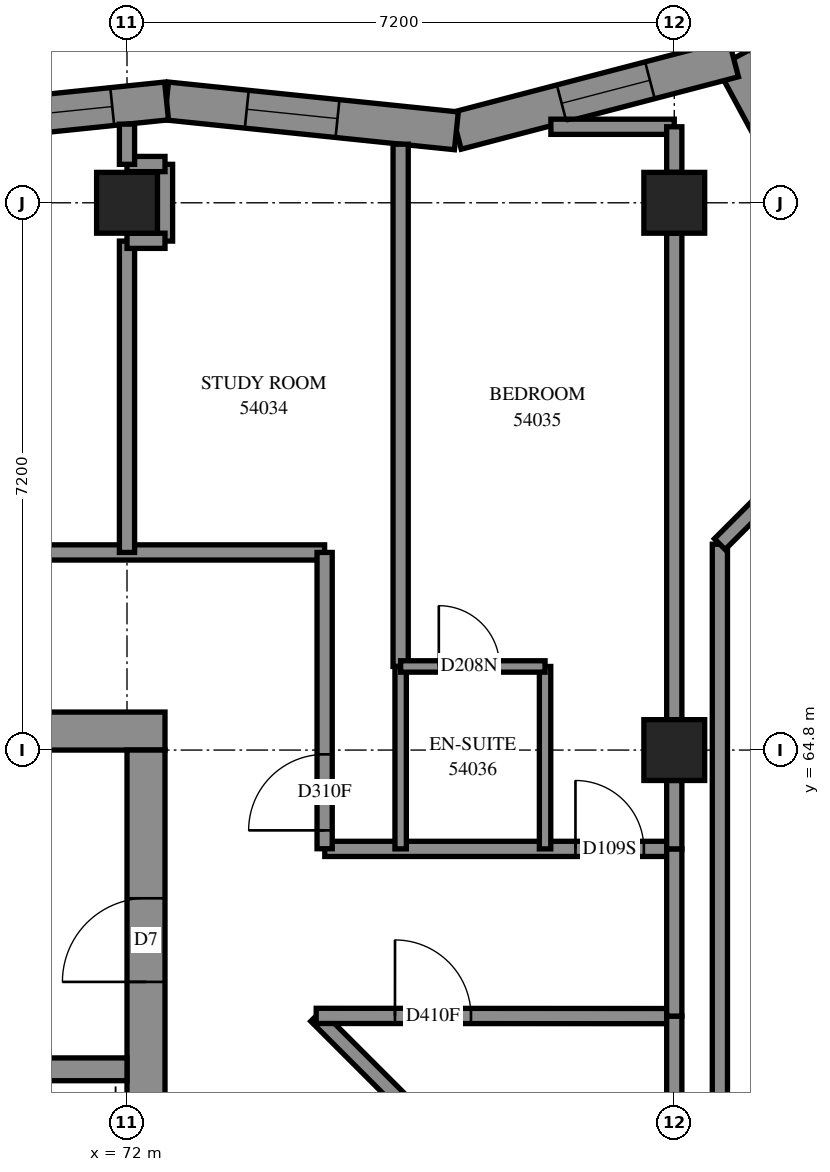
"""IFC4 building model, lengths in metres.
Left out: names, types, materials, properties, quantities, classifications, styles, units other than length and angle.
Written with IfcOpenShell. Run it as: python <this file> out.ifc"""

import sys

from ifc_helpers import new_model, si_unit, direction, frame, frame_2d, origin, origin_2d, place, context, subcontext, project, spatial, polyline, rectangle, outline, extrude, element, fill, save


model = new_model("IFC4")
c1 = context("Model", 3, precision=1e-05, world=origin(), true_north=direction((0.0, 1.0)))
c2 = subcontext(c1, "Body", "Model", "MODEL_VIEW")
j1 = project(units=[si_unit("LENGTHUNIT", "METRE"), si_unit("PLANEANGLEUNIT", "RADIAN")], contexts=[c1])
p1 = place(None, origin())
s1 = spatial("IfcSite", under=j1, at=p1, CompositionType="ELEMENT")
p2 = place(p1, origin())
s2 = spatial("IfcBuilding", under=s1, at=p2, CompositionType="ELEMENT")
p3 = place(p2, frame((0.0, 0.0, 199.8)))
s3 = spatial("IfcBuildingStorey", under=s2, at=p3, CompositionType="ELEMENT", Elevation=199.8)
for number, where, z_axis, x_axis in (
    (1, (72.0, 72.0, 0.0), (0.0, 0.0, 1.0), (1.0, 0.0, 0.0)),
    (2, (79.2, 64.8, 0.0), (0.0, 0.0, 1.0), (1.0, 0.0, 0.0)),
    (3, (79.2, 72.0, 0.0), (0.0, 0.0, 1.0), (1.0, 0.0, 0.0)),
):
    element("IfcColumn", number, at=place(p3, frame(where, z_axis=z_axis, x_axis=x_axis)), inside=s3, PredefinedType="COLUMN", context=c2, shape_type="SweptSolid", body=[
        extrude(rectangle(XDim=0.8, YDim=0.8, at=origin_2d()), origin(), (0.0, 0.0, 1.0), 3.1),
    ])
p4 = place(p3, frame((57.1, 65.05, -0.3), z_axis=(0.0, 0.0, 1.0), x_axis=(1.0, 0.0, 0.0)))
e4 = element("IfcWall", 4, at=p4, inside=s3, PredefinedType="SHEAR", context=c2, shape_type="SweptSolid", body=[
    extrude(rectangle(XDim=15.4, YDim=0.5, at=frame_2d((7.7, 0.0))), origin(), (0.0, 0.0, 1.0), 2.7),
])
p5 = place(p4, frame((10.5, 0.0, 0.3)))
e5 = element("IfcOpeningElement", 5, at=p5, cuts=e4, PredefinedType="OPENING", context=c2, shape_type="SweptSolid", body=[
    extrude(rectangle(XDim=0.8, YDim=2.1, at=frame_2d((0.4, 1.05))), frame((0.0, 0.26, 0.0), z_axis=(0.0, -1.0, 0.0), x_axis=(1.0, 0.0, 0.0)), (0.0, 0.0, 1.0), 0.52),
])
p6 = place(p3, frame((72.25, 50.4, -0.3), z_axis=(0.0, 0.0, 1.0), x_axis=(0.0, 1.0, 0.0)))
e6 = element("IfcWall", 6, at=p6, inside=s3, PredefinedType="SHEAR", context=c2, shape_type="SweptSolid", body=[
    extrude(rectangle(XDim=14.4, YDim=0.5, at=frame_2d((7.2, 0.0))), origin(), (0.0, 0.0, 1.0), 2.7),
])
p7 = place(p6, frame((4.55, 0.0, 0.3)))
e7 = element("IfcOpeningElement", 7, at=p7, cuts=e6, PredefinedType="OPENING", context=c2, shape_type="SweptSolid", body=[
    extrude(rectangle(XDim=1.1, YDim=2.1, at=frame_2d((0.55, 1.05))), frame((0.0, 0.26, 0.0), z_axis=(0.0, -1.0, 0.0), x_axis=(1.0, 0.0, 0.0)), (0.0, 0.0, 1.0), 0.52),
])
p8 = place(p6, frame((11.35, 0.0, 0.3)))
e8 = element("IfcOpeningElement", 8, at=p8, cuts=e6, PredefinedType="OPENING", context=c2, shape_type="SweptSolid", body=[
    extrude(rectangle(XDim=1.1, YDim=2.1, at=frame_2d((0.55, 1.05))), frame((0.0, 0.26, 0.0), z_axis=(0.0, -1.0, 0.0), x_axis=(1.0, 0.0, 0.0)), (0.0, 0.0, 1.0), 0.52),
])
p9 = place(p3, frame((64.8, 60.6, 0.0), z_axis=(0.0, 0.0, 1.0), x_axis=(1.0, 0.0, 0.0)))
e9 = element("IfcWall", 9, at=p9, inside=s3, PredefinedType="SOLIDWALL", context=c2, shape_type="SweptSolid", body=[
    extrude(rectangle(XDim=7.2, YDim=0.3, at=frame_2d((3.6, 0.0))), origin(), (0.0, 0.0, 1.0), 3.1),
])
p10 = place(p3, frame((81.567, 70.971, 0.0), z_axis=(0.0, 0.0, 1.0), x_axis=(-0.476089682, 0.8793967334, 0.0)))
e10 = element("IfcWall", 10, at=p10, inside=s3, PredefinedType="SOLIDWALL", context=c2, shape_type="SweptSolid", body=[
    extrude(outline(polyline([(0.051, -0.25), (3.526, -0.25), (3.134, 0.25), (-0.051, 0.25), (0.051, -0.25)])), origin(), (0.0, 0.0, 1.0), 3.1),
])
p11 = place(p10, frame((0.753, 0.0, 0.45)))
e11 = element("IfcOpeningElement", 11, at=p11, cuts=e10, PredefinedType="OPENING", context=c2, shape_type="SweptSolid", body=[
    extrude(rectangle(XDim=1.2, YDim=2.5, at=frame_2d((0.6, 1.25))), frame((0.0, 0.26, 0.0), z_axis=(0.0, -1.0, 0.0), x_axis=(1.0, 0.0, 0.0)), (0.0, 0.0, 1.0), 0.52),
])
p12 = place(p3, frame((79.981, 73.9, 0.0), z_axis=(0.0, 0.0, 1.0), x_axis=(-0.9675329998, -0.2527447216, 0.0)))
e12 = element("IfcWall", 12, at=p12, inside=s3, PredefinedType="SOLIDWALL", context=c2, shape_type="SweptSolid", body=[
    extrude(outline(polyline([(-0.196, -0.25), (3.725, -0.25), (3.815, 0.25), (0.196, 0.25), (-0.196, -0.25)])), origin(), (0.0, 0.0, 1.0), 3.1),
])
p13 = place(p12, frame((1.139, 0.0, 0.45)))
e13 = element("IfcOpeningElement", 13, at=p13, cuts=e12, PredefinedType="OPENING", context=c2, shape_type="SweptSolid", body=[
    extrude(rectangle(XDim=1.2, YDim=2.5, at=frame_2d((0.6, 1.25))), frame((0.0, 0.26, 0.0), z_axis=(0.0, -1.0, 0.0), x_axis=(1.0, 0.0, 0.0)), (0.0, 0.0, 1.0), 0.52),
])
p14 = place(p3, frame((76.333, 72.947, 0.0), z_axis=(0.0, 0.0, 1.0), x_axis=(-0.994730395, 0.10252532, 0.0)))
e14 = element("IfcWall", 14, at=p14, inside=s3, PredefinedType="SOLIDWALL", context=c2, shape_type="SweptSolid", body=[
    extrude(outline(polyline([(0.045, -0.25), (3.859, -0.25), (3.808, 0.25), (-0.045, 0.25), (0.045, -0.25)])), origin(), (0.0, 0.0, 1.0), 3.1),
])
p15 = place(p14, frame((1.572, 0.0, 0.45)))
e15 = element("IfcOpeningElement", 15, at=p15, cuts=e14, PredefinedType="OPENING", context=c2, shape_type="SweptSolid", body=[
    extrude(rectangle(XDim=1.2, YDim=2.5, at=frame_2d((0.6, 1.25))), frame((0.0, 0.26, 0.0), z_axis=(0.0, -1.0, 0.0), x_axis=(1.0, 0.0, 0.0)), (0.0, 0.0, 1.0), 0.52),
])
p16 = place(p3, frame((72.52, 73.34, 0.0), z_axis=(0.0, 0.0, 1.0), x_axis=(-0.9947306832, -0.1025225234, 0.0)))
e16 = element("IfcWall", 16, at=p16, inside=s3, PredefinedType="SOLIDWALL", context=c2, shape_type="SweptSolid", body=[
    extrude(outline(polyline([(-0.026, -0.25), (3.788, -0.25), (3.84, 0.25), (0.026, 0.25), (-0.026, -0.25)])), origin(), (0.0, 0.0, 1.0), 3.1),
])
p17 = place(p16, frame((0.718, 0.0, 0.45)))
e17 = element("IfcOpeningElement", 17, at=p17, cuts=e16, PredefinedType="OPENING", context=c2, shape_type="SweptSolid", body=[
    extrude(rectangle(XDim=1.3, YDim=2.5, at=frame_2d((0.65, 1.25))), frame((0.0, 0.26, 0.0), z_axis=(0.0, -1.0, 0.0), x_axis=(1.0, 0.0, 0.0)), (0.0, 0.0, 1.0), 0.52),
])
p18 = place(p16, frame((2.168, 0.0, 0.45)))
e18 = element("IfcOpeningElement", 18, at=p18, cuts=e16, PredefinedType="OPENING", context=c2, shape_type="SweptSolid", body=[
    extrude(rectangle(XDim=1.3, YDim=2.5, at=frame_2d((0.65, 1.25))), frame((0.0, 0.26, 0.0), z_axis=(0.0, -1.0, 0.0), x_axis=(1.0, 0.0, 0.0)), (0.0, 0.0, 1.0), 0.52),
])
p19 = place(p3, frame((55.0, 67.4, 0.0), z_axis=(0.0, 0.0, 1.0), x_axis=(1.0, 0.0, 0.0)))
e19 = element("IfcWall", 19, at=p19, inside=s3, PredefinedType="PARTITIONING", context=c2, shape_type="SweptSolid", body=[
    extrude(rectangle(XDim=19.6, YDim=0.2, at=frame_2d((9.8, 0.0))), origin(), (0.0, 0.0, 1.0), 3.1),
])
p20 = place(p19, frame((6.499, 0.0, 0.0)))
e20 = element("IfcOpeningElement", 20, at=p20, cuts=e19, PredefinedType="OPENING", context=c2, shape_type="SweptSolid", body=[
    extrude(rectangle(XDim=0.9, YDim=2.1, at=frame_2d((0.45, 1.05))), frame((0.0, 0.11, 0.0), z_axis=(0.0, -1.0, 0.0), x_axis=(1.0, 0.0, 0.0)), (0.0, 0.0, 1.0), 0.22),
])
p21 = place(p19, frame((14.001, 0.0, 0.0)))
e21 = element("IfcOpeningElement", 21, at=p21, cuts=e19, PredefinedType="OPENING", context=c2, shape_type="SweptSolid", body=[
    extrude(rectangle(XDim=0.9, YDim=2.1, at=frame_2d((0.45, 1.05))), frame((0.0, 0.11, 0.0), z_axis=(0.0, -1.0, 0.0), x_axis=(1.0, 0.0, 0.0)), (0.0, 0.0, 1.0), 0.22),
])
p22 = place(p3, frame((79.8, 55.986, 0.0), z_axis=(0.0, 0.0, 1.0), x_axis=(0.0, 1.0, 0.0)))
e22 = element("IfcWall", 22, at=p22, inside=s3, PredefinedType="PARTITIONING", context=c2, shape_type="SweptSolid", body=[
    extrude(rectangle(XDim=11.522, YDim=0.2, at=frame_2d((5.761, 0.0))), origin(), (0.0, 0.0, 1.0), 3.1),
])
p23 = place(p3, frame((79.837, 55.951, 0.0), z_axis=(0.0, 0.0, 1.0), x_axis=(0.7071067812, 0.7071067812, 0.0)))
e23 = element("IfcWall", 23, at=p23, inside=s3, PredefinedType="PARTITIONING", context=c2, shape_type="SweptSolid", body=[
    extrude(rectangle(XDim=9.897, YDim=0.2, at=frame_2d((4.948, 0.0))), origin(), (0.0, 0.0, 1.0), 3.1),
])
p24 = place(p23, frame((0.873, 0.0, 0.0)))
e24 = element("IfcOpeningElement", 24, at=p24, cuts=e23, PredefinedType="OPENING", context=c2, shape_type="SweptSolid", body=[
    extrude(rectangle(XDim=1.0, YDim=2.1, at=frame_2d((0.5, 1.05))), frame((0.0, 0.11, 0.0), z_axis=(0.0, -1.0, 0.0), x_axis=(1.0, 0.0, 0.0)), (0.0, 0.0, 1.0), 0.22),
])
p25 = place(p3, frame((75.6, 65.9, 0.0), z_axis=(0.0, 0.0, 1.0), x_axis=(0.0, 1.0, 0.0)))
e25 = element("IfcWall", 25, at=p25, inside=s3, PredefinedType="PARTITIONING", context=c2, shape_type="SweptSolid", body=[
    extrude(rectangle(XDim=6.871, YDim=0.2, at=frame_2d((3.435, 0.0))), origin(), (0.0, 0.0, 1.0), 3.1),
])
p26 = place(p3, frame((74.489, 61.303, 0.0), z_axis=(0.0, 0.0, 1.0), x_axis=(0.7071892763, -0.7070242765, 0.0)))
e26 = element("IfcWall", 26, at=p26, inside=s3, PredefinedType="PARTITIONING", context=c2, shape_type="SweptSolid", body=[
    extrude(rectangle(XDim=6.667, YDim=0.2, at=frame_2d((3.333, 0.0))), origin(), (0.0, 0.0, 1.0), 3.1),
])
p27 = place(p3, frame((79.2, 65.2, 0.0), z_axis=(0.0, 0.0, 1.0), x_axis=(0.0, 1.0, 0.0)))
e27 = element("IfcWall", 27, at=p27, inside=s3, PredefinedType="PARTITIONING", context=c2, shape_type="SweptSolid", body=[
    extrude(rectangle(XDim=6.4, YDim=0.2, at=frame_2d((3.2, 0.0))), origin(), (0.0, 0.0, 1.0), 3.1),
])
p28 = place(p3, frame((74.489, 61.303, 0.0), z_axis=(0.0, 0.0, 1.0), x_axis=(0.9999998105, -0.0006155543, 0.0)))
e28 = element("IfcWall", 28, at=p28, inside=s3, PredefinedType="PARTITIONING", context=c2, shape_type="SweptSolid", body=[
    extrude(rectangle(XDim=4.711, YDim=0.2, at=frame_2d((2.356, 0.0))), origin(), (0.0, 0.0, 1.0), 3.1),
])
p29 = place(p28, frame((1.037, 0.0, 0.0)))
e29 = element("IfcOpeningElement", 29, at=p29, cuts=e28, PredefinedType="OPENING", context=c2, shape_type="SweptSolid", body=[
    extrude(rectangle(XDim=1.0, YDim=2.1, at=frame_2d((0.5, 1.05))), frame((0.0, 0.11, 0.0), z_axis=(0.0, -1.0, 0.0), x_axis=(1.0, 0.0, 0.0)), (0.0, 0.0, 1.0), 0.22),
])
p30 = place(p3, frame((74.602, 63.5, 0.0), z_axis=(0.0, 0.0, 1.0), x_axis=(1.0, 0.0, 0.0)))
e30 = element("IfcWall", 30, at=p30, inside=s3, PredefinedType="PARTITIONING", context=c2, shape_type="SweptSolid", body=[
    extrude(rectangle(XDim=4.598, YDim=0.2, at=frame_2d((2.299, 0.0))), origin(), (0.0, 0.0, 1.0), 3.1),
])
p31 = place(p30, frame((3.298, 0.0, 0.0)))
e31 = element("IfcOpeningElement", 31, at=p31, cuts=e30, PredefinedType="OPENING", context=c2, shape_type="SweptSolid", body=[
    extrude(rectangle(XDim=0.9, YDim=2.1, at=frame_2d((0.45, 1.05))), frame((0.0, 0.11, 0.0), z_axis=(0.0, -1.0, 0.0), x_axis=(1.0, 0.0, 0.0)), (0.0, 0.0, 1.0), 0.22),
])
p32 = place(p3, frame((72.0, 67.4, 0.0), z_axis=(0.0, 0.0, 1.0), x_axis=(0.0, 1.0, 0.0)))
e32 = element("IfcWall", 32, at=p32, inside=s3, PredefinedType="PARTITIONING", context=c2, shape_type="SweptSolid", body=[
    extrude(rectangle(XDim=4.096, YDim=0.2, at=frame_2d((2.048, 0.0))), origin(), (0.0, 0.0, 1.0), 3.1),
])
p33 = place(p3, frame((74.6, 63.502, 0.0), z_axis=(0.0, 0.0, 1.0), x_axis=(0.0, 1.0, 0.0)))
e33 = element("IfcWall", 33, at=p33, inside=s3, PredefinedType="PARTITIONING", context=c2, shape_type="SweptSolid", body=[
    extrude(rectangle(XDim=3.898, YDim=0.2, at=frame_2d((1.949, 0.0))), origin(), (0.0, 0.0, 1.0), 3.1),
])
p34 = place(p33, frame((0.242, 0.0, 0.0)))
e34 = element("IfcOpeningElement", 34, at=p34, cuts=e33, PredefinedType="OPENING", context=c2, shape_type="SweptSolid", body=[
    extrude(rectangle(XDim=1.0, YDim=2.1, at=frame_2d((0.5, 1.05))), frame((0.0, 0.11, 0.0), z_axis=(0.0, -1.0, 0.0), x_axis=(1.0, 0.0, 0.0)), (0.0, 0.0, 1.0), 0.22),
])
p35 = place(p3, frame((79.799, 67.509, 0.0), z_axis=(0.0, 0.0, 1.0), x_axis=(0.7070928405, 0.7071207216, 0.0)))
e35 = element("IfcWall", 35, at=p35, inside=s3, PredefinedType="PARTITIONING", context=c2, shape_type="SweptSolid", body=[
    extrude(rectangle(XDim=3.587, YDim=0.2, at=frame_2d((1.793, 0.0))), origin(), (0.0, 0.0, 1.0), 3.1),
])
p36 = place(p3, frame((79.2, 58.0, 0.0), z_axis=(0.0, 0.0, 1.0), x_axis=(0.0, 1.0, 0.0)))
e36 = element("IfcWall", 36, at=p36, inside=s3, PredefinedType="PARTITIONING", context=c2, shape_type="SweptSolid", body=[
    extrude(rectangle(XDim=3.3, YDim=0.2, at=frame_2d((1.65, 0.0))), origin(), (0.0, 0.0, 1.0), 3.1),
])
for number, where, z_axis, x_axis in (
    (37, (75.6, 63.5, 0.0), (0.0, 0.0, 1.0), (0.0, 1.0, 0.0)),
    (38, (77.5, 63.5, 0.0), (0.0, 0.0, 1.0), (0.0, 1.0, 0.0)),
):
    element("IfcWall", number, at=place(p3, frame(where, z_axis=z_axis, x_axis=x_axis)), inside=s3, PredefinedType="PARTITIONING", context=c2, shape_type="SweptSolid", body=[
        extrude(rectangle(XDim=2.4, YDim=0.15, at=frame_2d((1.2, 0.0))), origin(), (0.0, 0.0, 1.0), 3.1),
    ])
p37 = place(p3, frame((79.2, 61.3, 0.0), z_axis=(0.0, 0.0, 1.0), x_axis=(0.0, 1.0, 0.0)))
e39 = element("IfcWall", 39, at=p37, inside=s3, PredefinedType="PARTITIONING", context=c2, shape_type="SweptSolid", body=[
    extrude(rectangle(XDim=2.2, YDim=0.2, at=frame_2d((1.1, 0.0))), origin(), (0.0, 0.0, 1.0), 3.1),
])
p38 = place(p3, frame((75.6, 65.9, 0.0), z_axis=(0.0, 0.0, 1.0), x_axis=(1.0, 0.0, 0.0)))
e40 = element("IfcWall", 40, at=p38, inside=s3, PredefinedType="PARTITIONING", context=c2, shape_type="SweptSolid", body=[
    extrude(rectangle(XDim=1.9, YDim=0.15, at=frame_2d((0.95, 0.0))), origin(), (0.0, 0.0, 1.0), 3.1),
])
p39 = place(p38, frame((0.502, 0.0, 0.0)))
e41 = element("IfcOpeningElement", 41, at=p39, cuts=e40, PredefinedType="OPENING", context=c2, shape_type="SweptSolid", body=[
    extrude(rectangle(XDim=0.8, YDim=2.1, at=frame_2d((0.4, 1.05))), frame((0.0, 0.085, 0.0), z_axis=(0.0, -1.0, 0.0), x_axis=(1.0, 0.0, 0.0)), (0.0, 0.0, 1.0), 0.17),
])
p40 = place(p3, frame((77.577, 73.0, 0.0), z_axis=(0.0, 0.0, 1.0), x_axis=(1.0, 0.0, 0.0)))
e42 = element("IfcWall", 42, at=p40, inside=s3, PredefinedType="PARTITIONING", context=c2, shape_type="SweptSolid", body=[
    extrude(rectangle(XDim=1.623, YDim=0.2, at=frame_2d((0.812, 0.0))), origin(), (0.0, 0.0, 1.0), 3.1),
])
p41 = place(p3, frame((72.5, 71.496, 0.0), z_axis=(0.0, 0.0, 1.0), x_axis=(0.0, 1.0, 0.0)))
e43 = element("IfcWall", 43, at=p41, inside=s3, PredefinedType="PARTITIONING", context=c2, shape_type="SweptSolid", body=[
    extrude(rectangle(XDim=1.01, YDim=0.2, at=frame_2d((0.505, 0.0))), origin(), (0.0, 0.0, 1.0), 3.1),
])
p42 = place(p3, frame((79.2, 63.5, 0.0), z_axis=(0.0, 0.0, 1.0), x_axis=(0.0, 1.0, 0.0)))
e44 = element("IfcWall", 44, at=p42, inside=s3, PredefinedType="PARTITIONING", context=c2, shape_type="SweptSolid", body=[
    extrude(rectangle(XDim=0.9, YDim=0.2, at=frame_2d((0.45, 0.0))), origin(), (0.0, 0.0, 1.0), 3.1),
])
p43 = place(p3, frame((79.2, 72.4, 0.0), z_axis=(0.0, 0.0, 1.0), x_axis=(0.0, 1.0, 0.0)))
e45 = element("IfcWall", 45, at=p43, inside=s3, PredefinedType="PARTITIONING", context=c2, shape_type="SweptSolid", body=[
    extrude(rectangle(XDim=0.6, YDim=0.2, at=frame_2d((0.3, 0.0))), origin(), (0.0, 0.0, 1.0), 3.1),
])
for number, where, z_axis, x_axis in (
    (46, (72.0, 71.5, 0.0), (0.0, 0.0, 1.0), (1.0, 0.0, 0.0)),
    (47, (72.0, 72.51, 0.0), (0.0, 0.0, 1.0), (1.0, 0.0, 0.0)),
):
    element("IfcWall", number, at=place(p3, frame(where, z_axis=z_axis, x_axis=x_axis)), inside=s3, PredefinedType="PARTITIONING", context=c2, shape_type="SweptSolid", body=[
        extrude(rectangle(XDim=0.5, YDim=0.2, at=frame_2d((0.25, 0.0))), origin(), (0.0, 0.0, 1.0), 3.1),
    ])
p44 = place(p3, frame((72.0, 72.506, 0.0), z_axis=(0.0, 0.0, 1.0), x_axis=(0.0, 1.0, 0.0)))
e48 = element("IfcWall", 48, at=p44, inside=s3, PredefinedType="PARTITIONING", context=c2, shape_type="SweptSolid", body=[
    extrude(rectangle(XDim=0.529, YDim=0.2, at=frame_2d((0.264, 0.0))), origin(), (0.0, 0.0, 1.0), 3.1),
])
p45 = place(p13, origin())
e49 = element("IfcWindow", 49, at=p45, inside=s3, PartitioningType="SINGLE_PANEL", PredefinedType="WINDOW", context=c2, shape_type="SweptSolid", body=[
    extrude(rectangle(XDim=1.2, YDim=2.5, at=frame_2d((0.6, 1.25))), frame((0.0, 0.18, 0.0), z_axis=(0.0, -1.0, 0.0), x_axis=(1.0, 0.0, 0.0)), (0.0, 0.0, 1.0), 0.06),
])
fill(e13, e49)
p46 = place(p15, origin())
e50 = element("IfcWindow", 50, at=p46, inside=s3, PartitioningType="SINGLE_PANEL", PredefinedType="WINDOW", context=c2, shape_type="SweptSolid", body=[
    extrude(rectangle(XDim=1.2, YDim=2.5, at=frame_2d((0.6, 1.25))), frame((0.0, 0.18, 0.0), z_axis=(0.0, -1.0, 0.0), x_axis=(1.0, 0.0, 0.0)), (0.0, 0.0, 1.0), 0.06),
])
fill(e15, e50)
p47 = place(p17, origin())
e51 = element("IfcWindow", 51, at=p47, inside=s3, PartitioningType="SINGLE_PANEL", PredefinedType="WINDOW", context=c2, shape_type="SweptSolid", body=[
    extrude(rectangle(XDim=1.3, YDim=2.5, at=frame_2d((0.65, 1.25))), frame((0.0, 0.18, 0.0), z_axis=(0.0, -1.0, 0.0), x_axis=(1.0, 0.0, 0.0)), (0.0, 0.0, 1.0), 0.06),
])
fill(e17, e51)
p48 = place(p8, origin())
e52 = element("IfcDoor", 52, at=p48, inside=s3, OperationType="SINGLE_SWING_RIGHT", PredefinedType="DOOR", context=c2, shape_type="SweptSolid", body=[
    extrude(rectangle(XDim=1.1, YDim=2.1, at=frame_2d((0.55, 1.05))), frame((0.0, 0.025, 0.0), z_axis=(0.0, -1.0, 0.0), x_axis=(1.0, 0.0, 0.0)), (0.0, 0.0, 1.0), 0.05),
])
fill(e8, e52)
p49 = place(p34, origin())
e53 = element("IfcDoor", 53, at=p49, inside=s3, OperationType="SINGLE_SWING_RIGHT", PredefinedType="DOOR", context=c2, shape_type="SweptSolid", body=[
    extrude(rectangle(XDim=1.0, YDim=2.1, at=frame_2d((0.5, 1.05))), frame((0.0, 0.025, 0.0), z_axis=(0.0, -1.0, 0.0), x_axis=(1.0, 0.0, 0.0)), (0.0, 0.0, 1.0), 0.05),
])
fill(e34, e53)
p50 = place(p31, origin())
e54 = element("IfcDoor", 54, at=p50, inside=s3, OperationType="SINGLE_SWING_LEFT", PredefinedType="DOOR", context=c2, shape_type="SweptSolid", body=[
    extrude(rectangle(XDim=0.9, YDim=2.1, at=frame_2d((0.45, 1.05))), frame((0.0, 0.025, 0.0), z_axis=(0.0, -1.0, 0.0), x_axis=(1.0, 0.0, 0.0)), (0.0, 0.0, 1.0), 0.05),
])
fill(e31, e54)
p51 = place(p39, origin())
e55 = element("IfcDoor", 55, at=p51, inside=s3, OperationType="SINGLE_SWING_RIGHT", PredefinedType="DOOR", context=c2, shape_type="SweptSolid", body=[
    extrude(rectangle(XDim=0.8, YDim=2.1, at=frame_2d((0.4, 1.05))), frame((0.0, 0.025, 0.0), z_axis=(0.0, -1.0, 0.0), x_axis=(1.0, 0.0, 0.0)), (0.0, 0.0, 1.0), 0.05),
])
fill(e41, e55)
p52 = place(p29, origin())
e56 = element("IfcDoor", 56, at=p52, inside=s3, OperationType="SINGLE_SWING_RIGHT", PredefinedType="DOOR", context=c2, shape_type="SweptSolid", body=[
    extrude(rectangle(XDim=1.0, YDim=2.1, at=frame_2d((0.5, 1.05))), frame((0.0, 0.025, 0.0), z_axis=(0.0, -1.0, 0.0), x_axis=(1.0, 0.0, 0.0)), (0.0, 0.0, 1.0), 0.05),
])
fill(e29, e56)
save(model, sys.argv[1])
